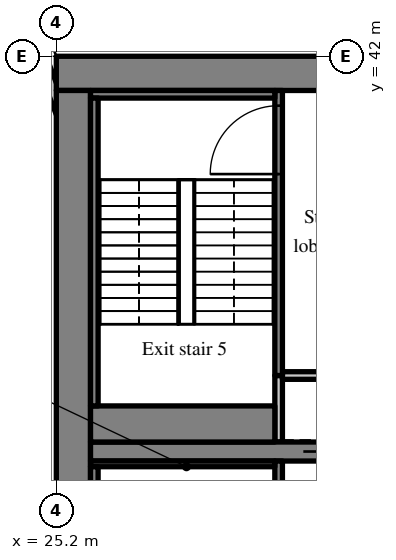
"""IFC4 building model, lengths in metres.
Left out: names, types, materials, properties, quantities, classifications, styles, units other than length and angle.
Written with IfcOpenShell. Run it as: python <this file> out.ifc"""

import sys

from ifc_helpers import new_model, si_unit, direction, frame, frame_2d, origin, place, context, subcontext, project, spatial, rectangle, extrude, source, transform, mapped, element, fill, save


model = new_model("IFC4")
c1 = context("Model", 3, precision=1e-05, world=origin(), true_north=direction((0.0, 1.0)))
c2 = subcontext(c1, "Body", "Model", "MODEL_VIEW")
j1 = project(units=[si_unit("LENGTHUNIT", "METRE"), si_unit("PLANEANGLEUNIT", "RADIAN")], contexts=[c1])
p1 = place(None, origin())
s1 = spatial("IfcSite", under=j1, at=p1, CompositionType="ELEMENT")
p2 = place(p1, origin())
s2 = spatial("IfcBuilding", under=s1, at=p2, CompositionType="ELEMENT")
p3 = place(p2, frame((0.0, 0.0, 102.8)))
s3 = spatial("IfcBuildingStorey", under=s2, at=p3, CompositionType="ELEMENT", Elevation=102.8)
m1 = source(origin(), c2, "Body", "SweptSolid", [
    extrude(rectangle(XDim=50.4, YDim=0.9, at=frame_2d((25.2, 0.0))), origin(), (0.0, 0.0, 1.0), 3.52),
])
p4 = place(p3, frame((25.2, 41.55, 0.0), z_axis=(0.0, 0.0, 1.0), x_axis=(1.0, 0.0, 0.0)))
e1 = element("IfcWall", 1, at=p4, inside=s3, PredefinedType="SHEAR", context=c2, shape_type="MappedRepresentation", body=[
    mapped(m1, transform((0.0, 0.0, 0.0), scale=1.0)),
])
m2 = source(origin(), c2, "Body", "SweptSolid", [
    extrude(rectangle(XDim=18.2, YDim=0.9, at=frame_2d((9.1, 0.0))), origin(), (0.0, 0.0, 1.0), 3.52),
])
p5 = place(p3, frame((25.65, 22.9, 0.0), z_axis=(0.0, 0.0, 1.0), x_axis=(0.0, 1.0, 0.0)))
e2 = element("IfcWall", 2, at=p5, inside=s3, PredefinedType="SHEAR", context=c2, shape_type="MappedRepresentation", body=[
    mapped(m2, transform((0.0, 0.0, 0.0), scale=1.0)),
])
m3 = source(origin(), c2, "Body", "SweptSolid", [
    extrude(rectangle(XDim=7.25, YDim=0.5, at=frame_2d((3.625, 0.0))), origin(), (0.0, 0.0, 1.0), 3.52),
])
p6 = place(p3, frame((26.1, 31.6, 0.0), z_axis=(0.0, 0.0, 1.0), x_axis=(1.0, 0.0, 0.0)))
e3 = element("IfcWall", 3, at=p6, inside=s3, PredefinedType="SHEAR", context=c2, shape_type="MappedRepresentation", body=[
    mapped(m3, transform((0.0, 0.0, 0.0), scale=1.0)),
])
m4 = source(origin(), c2, "Body", "SweptSolid", [
    extrude(rectangle(XDim=1.1, YDim=2.1, at=frame_2d((0.55, 1.05))), frame((0.0, 0.26, 0.0), z_axis=(0.0, -1.0, 0.0), x_axis=(1.0, 0.0, 0.0)), (0.0, 0.0, 1.0), 0.52),
])
p7 = place(p6, frame((5.6, 0.0, 0.0)))
e4 = element("IfcOpeningElement", 4, at=p7, cuts=e3, PredefinedType="OPENING", context=c2, shape_type="MappedRepresentation", body=[
    mapped(m4, transform((0.0, 0.0, 0.0), scale=1.0)),
])
m5 = source(origin(), c2, "Body", "SweptSolid", [
    extrude(rectangle(XDim=3.559, YDim=0.3, at=frame_2d((1.78, 0.0))), origin(), (0.0, 0.0, 1.0), 3.52),
])
p8 = place(p3, frame((25.55, 39.969, 0.0), z_axis=(0.0, 0.0, 1.0), x_axis=(-0.35779745313, 0.933799219604, 0.0)))
e5 = element("IfcWall", 5, at=p8, inside=s3, PredefinedType="SOLIDWALL", context=c2, shape_type="MappedRepresentation", body=[
    mapped(m5, transform((0.0, 0.0, 0.0), scale=1.0)),
])
m6 = source(origin(), c2, "Body", "SweptSolid", [
    extrude(rectangle(XDim=1.5, YDim=2.0, at=frame_2d((0.75, 1.0))), frame((0.0, 0.16, 0.0), z_axis=(0.0, -1.0, 0.0), x_axis=(1.0, 0.0, 0.0)), (0.0, 0.0, 1.0), 0.32),
])
p9 = place(p8, frame((1.903, 0.0, 0.9)))
e6 = element("IfcOpeningElement", 6, at=p9, cuts=e5, PredefinedType="OPENING", context=c2, shape_type="MappedRepresentation", body=[
    mapped(m6, transform((0.0, 0.0, 0.0), scale=1.0)),
])
m7 = source(origin(), c2, "Body", "SweptSolid", [
    extrude(rectangle(XDim=8.45, YDim=0.2, at=frame_2d((4.225, 0.0))), origin(), (0.0, 0.0, 1.0), 3.52),
])
p10 = place(p3, frame((31.05, 22.9, 0.0), z_axis=(0.0, 0.0, 1.0), x_axis=(0.0, 1.0, 0.0)))
e7 = element("IfcWall", 7, at=p10, inside=s3, PredefinedType="SOLIDWALL", context=c2, shape_type="MappedRepresentation", body=[
    mapped(m7, transform((0.0, 0.0, 0.0), scale=1.0)),
])
m8 = source(origin(), c2, "Body", "SweptSolid", [
    extrude(rectangle(XDim=1.2, YDim=2.1, at=frame_2d((0.6, 1.05))), frame((0.0, 0.11, 0.0), z_axis=(0.0, -1.0, 0.0), x_axis=(1.0, 0.0, 0.0)), (0.0, 0.0, 1.0), 0.22),
])
p11 = place(p10, frame((6.6, 0.0, 0.0)))
e8 = element("IfcOpeningElement", 8, at=p11, cuts=e7, PredefinedType="OPENING", context=c2, shape_type="MappedRepresentation", body=[
    mapped(m8, transform((0.0, 0.0, 0.0), scale=1.0)),
])
m9 = source(origin(), c2, "Body", "SweptSolid", [
    extrude(rectangle(XDim=1.75, YDim=0.2, at=frame_2d((0.875, 0.0))), origin(), (0.0, 0.0, 1.0), 3.52),
])
p12 = place(p3, frame((31.05, 31.85, 0.0), z_axis=(0.0, 0.0, 1.0), x_axis=(0.0, 1.0, 0.0)))
e9 = element("IfcWall", 9, at=p12, inside=s3, PredefinedType="SOLIDWALL", context=c2, shape_type="MappedRepresentation", body=[
    mapped(m9, transform((0.0, 0.0, 0.0), scale=1.0)),
])
m10 = source(origin(), c2, "Body", "SweptSolid", [
    extrude(rectangle(XDim=2.2, YDim=0.2, at=frame_2d((1.1, 0.0))), origin(), (0.0, 0.0, 1.0), 3.52),
])
p13 = place(p3, frame((31.15, 33.6, 0.0), z_axis=(0.0, 0.0, 1.0), x_axis=(1.0, 0.0, 0.0)))
e10 = element("IfcWall", 10, at=p13, inside=s3, PredefinedType="SOLIDWALL", context=c2, shape_type="MappedRepresentation", body=[
    mapped(m10, transform((0.0, 0.0, 0.0), scale=1.0)),
])
m11 = source(origin(), c2, "Body", "SweptSolid", [
    extrude(rectangle(XDim=7.5, YDim=0.2, at=frame_2d((3.75, 0.0))), origin(), (0.0, 0.0, 1.0), 3.52),
])
p14 = place(p3, frame((31.05, 33.6, 0.0), z_axis=(0.0, 0.0, 1.0), x_axis=(0.0, 1.0, 0.0)))
e11 = element("IfcWall", 11, at=p14, inside=s3, PredefinedType="SOLIDWALL", context=c2, shape_type="MappedRepresentation", body=[
    mapped(m11, transform((0.0, 0.0, 0.0), scale=1.0)),
])
m12 = source(origin(), c2, "Body", "SweptSolid", [
    extrude(rectangle(XDim=1.8, YDim=2.1, at=frame_2d((0.9, 1.05))), frame((0.0, 0.11, 0.0), z_axis=(0.0, -1.0, 0.0), x_axis=(1.0, 0.0, 0.0)), (0.0, 0.0, 1.0), 0.22),
])
p15 = place(p14, frame((5.3, 0.0, 0.0)))
e12 = element("IfcOpeningElement", 12, at=p15, cuts=e11, PredefinedType="OPENING", context=c2, shape_type="MappedRepresentation", body=[
    mapped(m12, transform((0.0, 0.0, 0.0), scale=1.0)),
])
m13 = source(origin(), c2, "Body", "SweptSolid", [
    extrude(rectangle(XDim=4.85, YDim=0.15, at=frame_2d((2.425, 0.0))), origin(), (0.0, 0.0, 1.0), 3.52),
])
p16 = place(p3, frame((26.1, 31.275, 0.0), z_axis=(0.0, 0.0, 1.0), x_axis=(1.0, 0.0, 0.0)))
e13 = element("IfcWall", 13, at=p16, inside=s3, PredefinedType="SOLIDWALL", context=c2, shape_type="MappedRepresentation", body=[
    mapped(m13, transform((0.0, 0.0, 0.0), scale=1.0)),
])
m14 = source(origin(), c2, "Body", "SweptSolid", [
    extrude(rectangle(XDim=8.1, YDim=0.2, at=frame_2d((4.05, 0.0))), origin(), (0.0, 0.0, 1.0), 3.52),
])
p17 = place(p3, frame((26.2, 23.1, 0.0), z_axis=(0.0, 0.0, 1.0), x_axis=(0.0, 1.0, 0.0)))
e14 = element("IfcWall", 14, at=p17, inside=s3, PredefinedType="SOLIDWALL", context=c2, shape_type="MappedRepresentation", body=[
    mapped(m14, transform((0.0, 0.0, 0.0), scale=1.0)),
])
m15 = source(origin(), c2, "Body", "SweptSolid", [
    extrude(rectangle(XDim=4.85, YDim=0.2, at=frame_2d((2.425, 0.0))), origin(), (0.0, 0.0, 1.0), 3.52),
])
p18 = place(p3, frame((26.1, 41.0, 0.0), z_axis=(0.0, 0.0, 1.0), x_axis=(1.0, 0.0, 0.0)))
e15 = element("IfcWall", 15, at=p18, inside=s3, PredefinedType="SOLIDWALL", context=c2, shape_type="MappedRepresentation", body=[
    mapped(m15, transform((0.0, 0.0, 0.0), scale=1.0)),
])
m16 = source(origin(), c2, "Body", "SweptSolid", [
    extrude(rectangle(XDim=4.85, YDim=0.95, at=frame_2d((2.425, 0.0))), origin(), (0.0, 0.0, 1.0), 3.52),
])
p19 = place(p3, frame((26.1, 32.325, 0.0), z_axis=(0.0, 0.0, 1.0), x_axis=(1.0, 0.0, 0.0)))
e16 = element("IfcWall", 16, at=p19, inside=s3, PredefinedType="SOLIDWALL", context=c2, shape_type="MappedRepresentation", body=[
    mapped(m16, transform((0.0, 0.0, 0.0), scale=1.0)),
])
p20 = place(p3, frame((26.2, 32.8, 0.0), z_axis=(0.0, 0.0, 1.0), x_axis=(0.0, 1.0, 0.0)))
e17 = element("IfcWall", 17, at=p20, inside=s3, PredefinedType="SOLIDWALL", context=c2, shape_type="MappedRepresentation", body=[
    mapped(m14, transform((0.0, 0.0, 0.0), scale=1.0)),
])
m17 = source(origin(), c2, "Body", "SweptSolid", [
    extrude(rectangle(XDim=1.1, YDim=2.1, at=frame_2d((0.55, 1.05))), frame((0.0, 0.025, 0.0), z_axis=(0.0, -1.0, 0.0), x_axis=(1.0, 0.0, 0.0)), (0.0, 0.0, 1.0), 0.05),
])
p21 = place(p7, origin())
e18 = element("IfcDoor", 18, at=p21, inside=s3, OperationType="SLIDING_TO_RIGHT", PredefinedType="DOOR", context=c2, shape_type="MappedRepresentation", body=[
    mapped(m17, transform((0.0, 0.0, 0.0), scale=1.0)),
])
fill(e4, e18)
m18 = source(origin(), c2, "Body", "SweptSolid", [
    extrude(rectangle(XDim=1.8, YDim=2.1, at=frame_2d((0.9, 1.05))), frame((0.0, 0.025, 0.0), z_axis=(0.0, -1.0, 0.0), x_axis=(1.0, 0.0, 0.0)), (0.0, 0.0, 1.0), 0.05),
])
p22 = place(p15, origin())
e19 = element("IfcDoor", 19, at=p22, inside=s3, OperationType="SINGLE_SWING_LEFT", PredefinedType="DOOR", context=c2, shape_type="MappedRepresentation", body=[
    mapped(m18, transform((0.0, 0.0, 0.0), scale=1.0)),
])
fill(e12, e19)
save(model, sys.argv[1])
